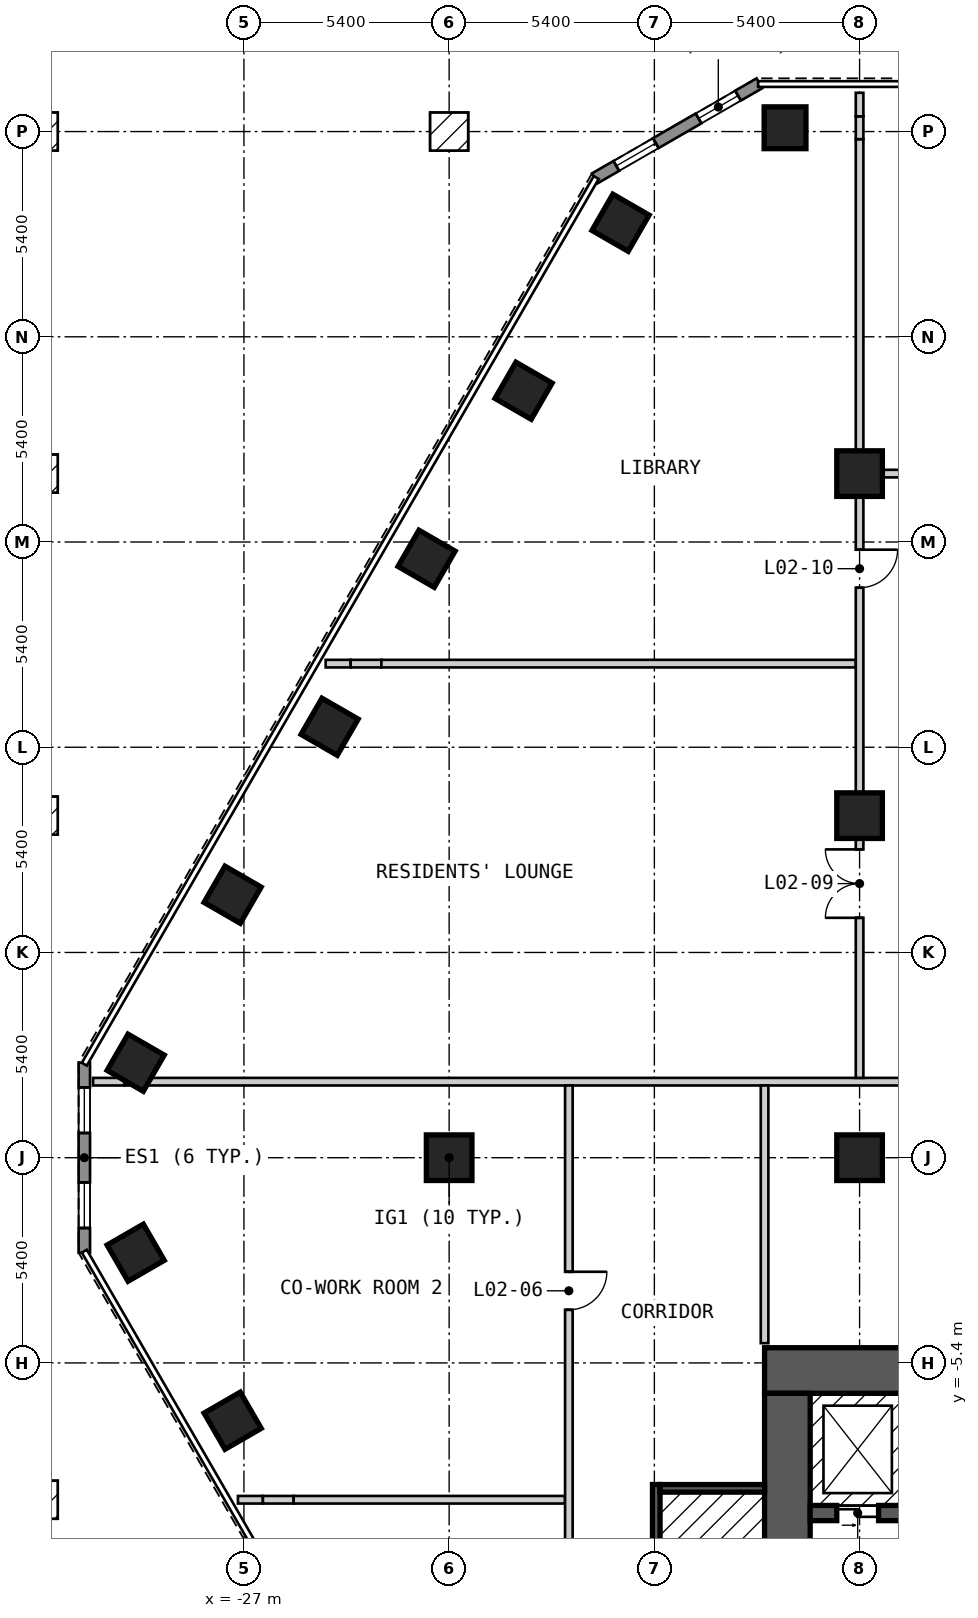
"""IFC4 building model, lengths in metres.
Left out: names, types, materials, properties, quantities, classifications, styles, units other than length and angle.
Written with IfcOpenShell. Run it as: python <this file> out.ifc"""

import sys

from ifc_helpers import new_model, si_unit, direction, frame, frame_2d, origin, origin_2d, place, context, subcontext, project, spatial, polyline, rectangle, outline, extrude, element, fill, save


model = new_model("IFC4")
c1 = context("Model", 3, precision=1e-05, world=origin(), true_north=direction((0.0, 1.0)))
c2 = subcontext(c1, "Body", "Model", "MODEL_VIEW")
j1 = project(units=[si_unit("LENGTHUNIT", "METRE"), si_unit("PLANEANGLEUNIT", "RADIAN")], contexts=[c1])
p1 = place(None, origin())
s1 = spatial("IfcSite", under=j1, at=p1, CompositionType="ELEMENT")
p2 = place(p1, origin())
s2 = spatial("IfcBuilding", under=s1, at=p2, CompositionType="ELEMENT")
p3 = place(p2, frame((0.0, 0.0, 9.0)))
s3 = spatial("IfcBuildingStorey", under=s2, at=p3, CompositionType="ELEMENT", Elevation=9.0)
for number, where, z_axis, x_axis in (
    (1, (-12.761, 27.1, 0.0), (0.0, 0.0, 1.0), (-1.0, 0.0, 0.0)),
    (2, (-17.09, 24.6, 0.0), (0.0, 0.0, 1.0), (-0.5, -0.866, 0.0)),
    (3, (-19.642, 20.18, 0.0), (0.0, 0.0, 1.0), (-0.5, -0.866, 0.0)),
    (4, (-22.194, 15.759, 0.0), (0.0, 0.0, 1.0), (-0.5, -0.866, 0.0)),
    (5, (-24.746, 11.339, 0.0), (0.0, 0.0, 1.0), (-0.5, -0.866, 0.0)),
    (6, (-27.298, 6.919, 0.0), (0.0, 0.0, 1.0), (-0.5, -0.866, 0.0)),
    (7, (-29.849, 2.499, 0.0), (0.0, 0.0, 1.0), (-0.5, -0.866, 0.0)),
    (8, (-29.848, -2.5, 0.0), (0.0, 0.0, 1.0), (0.5, -0.866, 0.0)),
    (9, (-27.297, -6.921, 0.0), (0.0, 0.0, 1.0), (0.5, -0.866, 0.0)),
):
    element("IfcColumn", number, at=place(p3, frame(where, z_axis=z_axis, x_axis=x_axis)), inside=s3, PredefinedType="COLUMN", context=c2, shape_type="SweptSolid", body=[
        extrude(rectangle(XDim=1.1, YDim=1.1, at=origin_2d()), origin(), (0.0, 0.0, 1.0), 3.6),
    ])
for number, where, z_axis, x_axis in (
    (10, (-21.6, 0.0, 0.0), (0.0, 0.0, 1.0), (1.0, 0.0, 0.0)),
    (11, (-10.8, 0.0, 0.0), (0.0, 0.0, 1.0), (1.0, 0.0, 0.0)),
    (12, (-10.8, 9.0, 0.0), (0.0, 0.0, 1.0), (1.0, 0.0, 0.0)),
    (13, (-10.8, 18.0, 0.0), (0.0, 0.0, 1.0), (1.0, 0.0, 0.0)),
):
    element("IfcColumn", number, at=place(p3, frame(where, z_axis=z_axis, x_axis=x_axis)), inside=s3, PredefinedType="COLUMN", context=c2, shape_type="SweptSolid", body=[
        extrude(rectangle(XDim=1.2, YDim=1.2, at=origin_2d()), origin(), (0.0, 0.0, 1.0), 3.6),
    ])
p4 = place(p3, frame((-13.3, -5.6, 0.0), z_axis=(0.0, 0.0, 1.0), x_axis=(1.0, 0.0, 0.0)))
e14 = element("IfcWall", 14, at=p4, inside=s3, PredefinedType="SHEAR", context=c2, shape_type="SweptSolid", body=[
    extrude(rectangle(XDim=26.6, YDim=1.2, at=frame_2d((13.3, 0.0))), origin(), (0.0, 0.0, 1.0), 3.25),
])
p5 = place(p4, frame((23.65, 0.0, 0.0)))
e15 = element("IfcOpeningElement", 15, at=p5, cuts=e14, PredefinedType="OPENING", context=c2, shape_type="SweptSolid", body=[
    extrude(rectangle(XDim=1.2, YDim=2.1, at=frame_2d((0.6, 1.05))), frame((0.0, 0.61, 0.0), z_axis=(0.0, -1.0, 0.0), x_axis=(1.0, 0.0, 0.0)), (0.0, 0.0, 1.0), 1.22),
])
p6 = place(p3, frame((-12.7, -17.8, 0.0), z_axis=(0.0, 0.0, 1.0), x_axis=(0.0, 1.0, 0.0)))
e16 = element("IfcWall", 16, at=p6, inside=s3, PredefinedType="SHEAR", context=c2, shape_type="SweptSolid", body=[
    extrude(rectangle(XDim=11.6, YDim=1.2, at=frame_2d((5.8, 0.0))), origin(), (0.0, 0.0, 1.0), 3.25),
])
p7 = place(p6, frame((3.6, 0.0, 0.0)))
e17 = element("IfcOpeningElement", 17, at=p7, cuts=e16, PredefinedType="OPENING", context=c2, shape_type="SweptSolid", body=[
    extrude(rectangle(XDim=1.2, YDim=2.1, at=frame_2d((0.6, 1.05))), frame((0.0, 0.61, 0.0), z_axis=(0.0, -1.0, 0.0), x_axis=(1.0, 0.0, 0.0)), (0.0, 0.0, 1.0), 1.22),
])
p8 = place(p3, frame((-12.1, -9.35, 0.0), z_axis=(0.0, 0.0, 1.0), x_axis=(1.0, 0.0, 0.0)))
e18 = element("IfcWall", 18, at=p8, inside=s3, PredefinedType="SHEAR", context=c2, shape_type="SweptSolid", body=[
    extrude(rectangle(XDim=22.3, YDim=0.4, at=frame_2d((11.15, 0.0))), origin(), (0.0, 0.0, 1.0), 3.25),
])
p9 = place(p8, frame((0.7, 0.0, 0.0)))
e19 = element("IfcOpeningElement", 19, at=p9, cuts=e18, PredefinedType="OPENING", context=c2, shape_type="SweptSolid", body=[
    extrude(rectangle(XDim=1.1, YDim=2.1, at=frame_2d((0.55, 1.05))), frame((0.0, 0.21, 0.0), z_axis=(0.0, -1.0, 0.0), x_axis=(1.0, 0.0, 0.0)), (0.0, 0.0, 1.0), 0.42),
])
p10 = place(p8, frame((3.5, 0.0, 0.0)))
e20 = element("IfcOpeningElement", 20, at=p10, cuts=e18, PredefinedType="OPENING", context=c2, shape_type="SweptSolid", body=[
    extrude(rectangle(XDim=1.1, YDim=2.1, at=frame_2d((0.55, 1.05))), frame((0.0, 0.21, 0.0), z_axis=(0.0, -1.0, 0.0), x_axis=(1.0, 0.0, 0.0)), (0.0, 0.0, 1.0), 0.42),
])
p11 = place(p8, frame((6.3, 0.0, 0.0)))
e21 = element("IfcOpeningElement", 21, at=p11, cuts=e18, PredefinedType="OPENING", context=c2, shape_type="SweptSolid", body=[
    extrude(rectangle(XDim=1.1, YDim=2.1, at=frame_2d((0.55, 1.05))), frame((0.0, 0.21, 0.0), z_axis=(0.0, -1.0, 0.0), x_axis=(1.0, 0.0, 0.0)), (0.0, 0.0, 1.0), 0.42),
])
p12 = place(p8, frame((8.6, 0.0, 0.0)))
e22 = element("IfcOpeningElement", 22, at=p12, cuts=e18, PredefinedType="OPENING", context=c2, shape_type="SweptSolid", body=[
    extrude(rectangle(XDim=1.1, YDim=2.1, at=frame_2d((0.55, 1.05))), frame((0.0, 0.21, 0.0), z_axis=(0.0, -1.0, 0.0), x_axis=(1.0, 0.0, 0.0)), (0.0, 0.0, 1.0), 0.42),
])
p13 = place(p8, frame((10.9, 0.0, 0.0)))
e23 = element("IfcOpeningElement", 23, at=p13, cuts=e18, PredefinedType="OPENING", context=c2, shape_type="SweptSolid", body=[
    extrude(rectangle(XDim=1.1, YDim=2.1, at=frame_2d((0.55, 1.05))), frame((0.0, 0.21, 0.0), z_axis=(0.0, -1.0, 0.0), x_axis=(1.0, 0.0, 0.0)), (0.0, 0.0, 1.0), 0.42),
])
p14 = place(p8, frame((13.2, 0.0, 0.0)))
e24 = element("IfcOpeningElement", 24, at=p14, cuts=e18, PredefinedType="OPENING", context=c2, shape_type="SweptSolid", body=[
    extrude(rectangle(XDim=1.1, YDim=2.1, at=frame_2d((0.55, 1.05))), frame((0.0, 0.21, 0.0), z_axis=(0.0, -1.0, 0.0), x_axis=(1.0, 0.0, 0.0)), (0.0, 0.0, 1.0), 0.42),
])
p15 = place(p8, frame((15.5, 0.0, 0.0)))
e25 = element("IfcOpeningElement", 25, at=p15, cuts=e18, PredefinedType="OPENING", context=c2, shape_type="SweptSolid", body=[
    extrude(rectangle(XDim=1.1, YDim=2.1, at=frame_2d((0.55, 1.05))), frame((0.0, 0.21, 0.0), z_axis=(0.0, -1.0, 0.0), x_axis=(1.0, 0.0, 0.0)), (0.0, 0.0, 1.0), 0.42),
])
p16 = place(p8, frame((17.8, 0.0, 0.0)))
e26 = element("IfcOpeningElement", 26, at=p16, cuts=e18, PredefinedType="OPENING", context=c2, shape_type="SweptSolid", body=[
    extrude(rectangle(XDim=1.1, YDim=2.1, at=frame_2d((0.55, 1.05))), frame((0.0, 0.21, 0.0), z_axis=(0.0, -1.0, 0.0), x_axis=(1.0, 0.0, 0.0)), (0.0, 0.0, 1.0), 0.42),
])
p17 = place(p8, frame((20.2, 0.0, 0.0)))
e27 = element("IfcOpeningElement", 27, at=p17, cuts=e18, PredefinedType="OPENING", context=c2, shape_type="SweptSolid", body=[
    extrude(rectangle(XDim=1.1, YDim=2.1, at=frame_2d((0.55, 1.05))), frame((0.0, 0.21, 0.0), z_axis=(0.0, -1.0, 0.0), x_axis=(1.0, 0.0, 0.0)), (0.0, 0.0, 1.0), 0.42),
])
p18 = place(p3, frame((-13.435, 28.27, 0.0), z_axis=(0.0, 0.0, 1.0), x_axis=(-0.866010750942, -0.50002537861, 0.0)))
e28 = element("IfcWall", 28, at=p18, inside=s3, PredefinedType="SOLIDWALL", context=c2, shape_type="SweptSolid", body=[
    extrude(outline(polyline([(0.0, -0.15), (5.0, -0.15), (4.919, 0.15), (0.08, 0.15), (0.0, -0.15)])), origin(), (0.0, 0.0, 1.0), 3.25),
])
p19 = place(p18, frame((0.65, 0.0, 0.15)))
e29 = element("IfcOpeningElement", 29, at=p19, cuts=e28, PredefinedType="OPENING", context=c2, shape_type="SweptSolid", body=[
    extrude(rectangle(XDim=1.2, YDim=2.1, at=frame_2d((0.6, 1.05))), frame((0.0, 0.16, 0.0), z_axis=(0.0, -1.0, 0.0), x_axis=(1.0, 0.0, 0.0)), (0.0, 0.0, 1.0), 0.32),
])
p20 = place(p18, frame((3.149, 0.0, 0.15)))
e30 = element("IfcOpeningElement", 30, at=p20, cuts=e28, PredefinedType="OPENING", context=c2, shape_type="SweptSolid", body=[
    extrude(rectangle(XDim=1.2, YDim=2.1, at=frame_2d((0.6, 1.05))), frame((0.0, 0.16, 0.0), z_axis=(0.0, -1.0, 0.0), x_axis=(1.0, 0.0, 0.0)), (0.0, 0.0, 1.0), 0.32),
])
p21 = place(p3, frame((-31.2, 2.5, 0.0), z_axis=(0.0, 0.0, 1.0), x_axis=(0.0, -1.0, 0.0)))
e31 = element("IfcWall", 31, at=p21, inside=s3, PredefinedType="SOLIDWALL", context=c2, shape_type="SweptSolid", body=[
    extrude(outline(polyline([(0.0, -0.15), (5.0, -0.15), (4.92, 0.15), (0.08, 0.15), (0.0, -0.15)])), origin(), (0.0, 0.0, 1.0), 3.25),
])
p22 = place(p21, frame((0.65, 0.0, 0.15)))
e32 = element("IfcOpeningElement", 32, at=p22, cuts=e31, PredefinedType="OPENING", context=c2, shape_type="SweptSolid", body=[
    extrude(rectangle(XDim=1.2, YDim=2.1, at=frame_2d((0.6, 1.05))), frame((0.0, 0.16, 0.0), z_axis=(0.0, -1.0, 0.0), x_axis=(1.0, 0.0, 0.0)), (0.0, 0.0, 1.0), 0.32),
])
p23 = place(p21, frame((3.15, 0.0, 0.15)))
e33 = element("IfcOpeningElement", 33, at=p23, cuts=e31, PredefinedType="OPENING", context=c2, shape_type="SweptSolid", body=[
    extrude(rectangle(XDim=1.2, YDim=2.1, at=frame_2d((0.6, 1.05))), frame((0.0, 0.16, 0.0), z_axis=(0.0, -1.0, 0.0), x_axis=(1.0, 0.0, 0.0)), (0.0, 0.0, 1.0), 0.32),
])
p24 = place(p3, frame((-27.158, -9.0, 0.0), z_axis=(0.0, 0.0, 1.0), x_axis=(1.0, 0.0, 0.0)))
e34 = element("IfcWall", 34, at=p24, inside=s3, PredefinedType="PARTITIONING", context=c2, shape_type="SweptSolid", body=[
    extrude(rectangle(XDim=0.657, YDim=0.2, at=frame_2d((0.329, 0.0))), origin(), (0.0, 0.0, 1.0), 3.25),
])
p25 = place(p3, frame((-26.501, -9.0, 0.0), z_axis=(0.0, 0.0, 1.0), x_axis=(1.0, 0.0, 0.0)))
e35 = element("IfcWall", 35, at=p25, inside=s3, PredefinedType="PARTITIONING", context=c2, shape_type="SweptSolid", body=[
    extrude(rectangle(XDim=0.809, YDim=0.2, at=frame_2d((0.405, 0.0))), origin(), (0.0, 0.0, 1.0), 2.52),
])
p26 = place(p3, frame((-25.692, -9.0, 0.0), z_axis=(0.0, 0.0, 1.0), x_axis=(1.0, 0.0, 0.0)))
e36 = element("IfcWall", 36, at=p26, inside=s3, PredefinedType="PARTITIONING", context=c2, shape_type="SweptSolid", body=[
    extrude(rectangle(XDim=7.142, YDim=0.2, at=frame_2d((3.571, 0.0))), origin(), (0.0, 0.0, 1.0), 3.25),
])
p27 = place(p3, frame((-30.97, 2.0, 0.0), z_axis=(0.0, 0.0, 1.0), x_axis=(1.0, 0.0, 0.0)))
e37 = element("IfcWall", 37, at=p27, inside=s3, PredefinedType="PARTITIONING", context=c2, shape_type="SweptSolid", body=[
    extrude(rectangle(XDim=0.821, YDim=0.2, at=frame_2d((0.411, 0.0))), origin(), (0.0, 0.0, 1.0), 3.25),
])
p28 = place(p3, frame((-30.149, 2.0, 0.0), z_axis=(0.0, 0.0, 1.0), x_axis=(1.0, 0.0, 0.0)))
e38 = element("IfcWall", 38, at=p28, inside=s3, PredefinedType="PARTITIONING", context=c2, shape_type="SweptSolid", body=[
    extrude(rectangle(XDim=0.6, YDim=0.2, at=frame_2d((0.3, 0.0))), origin(), (0.0, 0.0, 1.0), 2.52),
])
p29 = place(p3, frame((-29.549, 2.0, 0.0), z_axis=(0.0, 0.0, 1.0), x_axis=(1.0, 0.0, 0.0)))
e39 = element("IfcWall", 39, at=p29, inside=s3, PredefinedType="PARTITIONING", context=c2, shape_type="SweptSolid", body=[
    extrude(rectangle(XDim=59.097, YDim=0.2, at=frame_2d((29.549, 0.0))), origin(), (0.0, 0.0, 1.0), 3.25),
])
p30 = place(p29, frame((20.651, 0.0, 0.0)))
e40 = element("IfcOpeningElement", 40, at=p30, cuts=e39, PredefinedType="OPENING", context=c2, shape_type="SweptSolid", body=[
    extrude(rectangle(XDim=1.8, YDim=2.1, at=frame_2d((0.9, 1.05))), frame((0.0, 0.11, 0.0), z_axis=(0.0, -1.0, 0.0), x_axis=(1.0, 0.0, 0.0)), (0.0, 0.0, 1.0), 0.22),
])
p31 = place(p29, frame((36.647, 0.0, 0.0)))
e41 = element("IfcOpeningElement", 41, at=p31, cuts=e39, PredefinedType="OPENING", context=c2, shape_type="SweptSolid", body=[
    extrude(rectangle(XDim=1.8, YDim=2.1, at=frame_2d((0.9, 1.05))), frame((0.0, 0.11, 0.0), z_axis=(0.0, -1.0, 0.0), x_axis=(1.0, 0.0, 0.0)), (0.0, 0.0, 1.0), 0.22),
])
p32 = place(p29, frame((28.649, 0.0, 0.0)))
e42 = element("IfcOpeningElement", 42, at=p32, cuts=e39, PredefinedType="OPENING", context=c2, shape_type="SweptSolid", body=[
    extrude(rectangle(XDim=1.8, YDim=2.1, at=frame_2d((0.9, 1.05))), frame((0.0, 0.11, 0.0), z_axis=(0.0, -1.0, 0.0), x_axis=(1.0, 0.0, 0.0)), (0.0, 0.0, 1.0), 0.22),
])
p33 = place(p3, frame((-24.849, 13.0, 0.0), z_axis=(0.0, 0.0, 1.0), x_axis=(1.0, 0.0, 0.0)))
e43 = element("IfcWall", 43, at=p33, inside=s3, PredefinedType="PARTITIONING", context=c2, shape_type="SweptSolid", body=[
    extrude(rectangle(XDim=0.658, YDim=0.2, at=frame_2d((0.329, 0.0))), origin(), (0.0, 0.0, 1.0), 3.25),
])
p34 = place(p3, frame((-24.191, 13.0, 0.0), z_axis=(0.0, 0.0, 1.0), x_axis=(1.0, 0.0, 0.0)))
e44 = element("IfcWall", 44, at=p34, inside=s3, PredefinedType="PARTITIONING", context=c2, shape_type="SweptSolid", body=[
    extrude(rectangle(XDim=0.808, YDim=0.2, at=frame_2d((0.404, 0.0))), origin(), (0.0, 0.0, 1.0), 2.52),
])
p35 = place(p3, frame((-23.383, 13.0, 0.0), z_axis=(0.0, 0.0, 1.0), x_axis=(1.0, 0.0, 0.0)))
e45 = element("IfcWall", 45, at=p35, inside=s3, PredefinedType="PARTITIONING", context=c2, shape_type="SweptSolid", body=[
    extrude(rectangle(XDim=12.483, YDim=0.2, at=frame_2d((6.242, 0.0))), origin(), (0.0, 0.0, 1.0), 3.25),
])
p36 = place(p3, frame((-10.7, 18.0, 0.0), z_axis=(0.0, 0.0, 1.0), x_axis=(1.0, 0.0, 0.0)))
e46 = element("IfcWall", 46, at=p36, inside=s3, PredefinedType="PARTITIONING", context=c2, shape_type="SweptSolid", body=[
    extrude(rectangle(XDim=21.4, YDim=0.2, at=frame_2d((10.7, 0.0))), origin(), (0.0, 0.0, 1.0), 3.25),
])
p37 = place(p36, frame((8.86, 0.0, 0.0)))
e47 = element("IfcOpeningElement", 47, at=p37, cuts=e46, PredefinedType="OPENING", context=c2, shape_type="SweptSolid", body=[
    extrude(rectangle(XDim=1.0, YDim=2.1, at=frame_2d((0.5, 1.05))), frame((0.0, 0.11, 0.0), z_axis=(0.0, -1.0, 0.0), x_axis=(1.0, 0.0, 0.0)), (0.0, 0.0, 1.0), 0.22),
])
p38 = place(p3, frame((-18.45, -21.471, 0.0), z_axis=(0.0, 0.0, 1.0), x_axis=(0.0, 1.0, 0.0)))
e48 = element("IfcWall", 48, at=p38, inside=s3, PredefinedType="PARTITIONING", context=c2, shape_type="SweptSolid", body=[
    extrude(rectangle(XDim=23.371, YDim=0.2, at=frame_2d((11.686, 0.0))), origin(), (0.0, 0.0, 1.0), 3.25),
])
p39 = place(p38, frame((5.873, 0.0, 0.0)))
e49 = element("IfcOpeningElement", 49, at=p39, cuts=e48, PredefinedType="OPENING", context=c2, shape_type="SweptSolid", body=[
    extrude(rectangle(XDim=1.0, YDim=2.1, at=frame_2d((0.5, 1.05))), frame((0.0, 0.11, 0.0), z_axis=(0.0, -1.0, 0.0), x_axis=(1.0, 0.0, 0.0)), (0.0, 0.0, 1.0), 0.22),
])
p40 = place(p38, frame((17.469, 0.0, 0.0)))
e50 = element("IfcOpeningElement", 50, at=p40, cuts=e48, PredefinedType="OPENING", context=c2, shape_type="SweptSolid", body=[
    extrude(rectangle(XDim=1.0, YDim=2.1, at=frame_2d((0.5, 1.05))), frame((0.0, 0.11, 0.0), z_axis=(0.0, -1.0, 0.0), x_axis=(1.0, 0.0, 0.0)), (0.0, 0.0, 1.0), 0.22),
])
p41 = place(p3, frame((-13.3, -4.88, 0.0), z_axis=(0.0, 0.0, 1.0), x_axis=(0.0, 1.0, 0.0)))
e51 = element("IfcWall", 51, at=p41, inside=s3, PredefinedType="PARTITIONING", context=c2, shape_type="SweptSolid", body=[
    extrude(rectangle(XDim=6.78, YDim=0.2, at=frame_2d((3.39, 0.0))), origin(), (0.0, 0.0, 1.0), 3.25),
])
p42 = place(p3, frame((-10.8, 2.1, 0.0), z_axis=(0.0, 0.0, 1.0), x_axis=(0.0, 1.0, 0.0)))
e52 = element("IfcWall", 52, at=p42, inside=s3, PredefinedType="PARTITIONING", context=c2, shape_type="SweptSolid", body=[
    extrude(rectangle(XDim=24.7, YDim=0.2, at=frame_2d((12.35, 0.0))), origin(), (0.0, 0.0, 1.0), 3.25),
])
p43 = place(p42, frame((4.212, 0.0, 0.0)))
e53 = element("IfcOpeningElement", 53, at=p43, cuts=e52, PredefinedType="OPENING", context=c2, shape_type="SweptSolid", body=[
    extrude(rectangle(XDim=1.8, YDim=2.1, at=frame_2d((0.9, 1.05))), frame((0.0, 0.11, 0.0), z_axis=(0.0, -1.0, 0.0), x_axis=(1.0, 0.0, 0.0)), (0.0, 0.0, 1.0), 0.22),
])
p44 = place(p42, frame((12.898, 0.0, 0.0)))
e54 = element("IfcOpeningElement", 54, at=p44, cuts=e52, PredefinedType="OPENING", context=c2, shape_type="SweptSolid", body=[
    extrude(rectangle(XDim=1.0, YDim=2.1, at=frame_2d((0.5, 1.05))), frame((0.0, 0.11, 0.0), z_axis=(0.0, -1.0, 0.0), x_axis=(1.0, 0.0, 0.0)), (0.0, 0.0, 1.0), 0.22),
])
p45 = place(p3, frame((-10.8, 26.8, 0.0), z_axis=(0.0, 0.0, 1.0), x_axis=(0.0, 1.0, 0.0)))
e55 = element("IfcWall", 55, at=p45, inside=s3, PredefinedType="PARTITIONING", context=c2, shape_type="SweptSolid", body=[
    extrude(rectangle(XDim=0.6, YDim=0.2, at=frame_2d((0.3, 0.0))), origin(), (0.0, 0.0, 1.0), 2.52),
])
p46 = place(p3, frame((-10.8, 27.4, 0.0), z_axis=(0.0, 0.0, 1.0), x_axis=(0.0, 1.0, 0.0)))
e56 = element("IfcWall", 56, at=p46, inside=s3, PredefinedType="PARTITIONING", context=c2, shape_type="SweptSolid", body=[
    extrude(rectangle(XDim=0.62, YDim=0.2, at=frame_2d((0.31, 0.0))), origin(), (0.0, 0.0, 1.0), 3.25),
])
p47 = place(p3, frame((-16.15, -14.4, 0.0), z_axis=(0.0, 0.0, 1.0), x_axis=(0.0, 1.0, 0.0)))
e57 = element("IfcWall", 57, at=p47, inside=s3, PredefinedType="SOLIDWALL", context=c2, shape_type="SweptSolid", body=[
    extrude(rectangle(XDim=5.8, YDim=0.2, at=frame_2d((2.9, 0.0))), origin(), (0.0, 0.0, 1.0), 3.25),
])
p48 = place(p3, frame((-16.05, -8.7, 0.0), z_axis=(0.0, 0.0, 1.0), x_axis=(1.0, 0.0, 0.0)))
e58 = element("IfcWall", 58, at=p48, inside=s3, PredefinedType="SOLIDWALL", context=c2, shape_type="SweptSolid", body=[
    extrude(rectangle(XDim=2.75, YDim=0.2, at=frame_2d((1.375, 0.0))), origin(), (0.0, 0.0, 1.0), 3.25),
])
p49 = place(p19, origin())
e59 = element("IfcWindow", 59, at=p49, inside=s3, PartitioningType="SINGLE_PANEL", PredefinedType="WINDOW", context=c2, shape_type="SweptSolid", body=[
    extrude(rectangle(XDim=1.2, YDim=2.1, at=frame_2d((0.6, 1.05))), frame((0.0, 0.03, 0.0), z_axis=(0.0, -1.0, 0.0), x_axis=(1.0, 0.0, 0.0)), (0.0, 0.0, 1.0), 0.06),
])
fill(e29, e59)
p50 = place(p20, origin())
e60 = element("IfcWindow", 60, at=p50, inside=s3, PartitioningType="SINGLE_PANEL", PredefinedType="WINDOW", context=c2, shape_type="SweptSolid", body=[
    extrude(rectangle(XDim=1.2, YDim=2.1, at=frame_2d((0.6, 1.05))), frame((0.0, 0.03, 0.0), z_axis=(0.0, -1.0, 0.0), x_axis=(1.0, 0.0, 0.0)), (0.0, 0.0, 1.0), 0.06),
])
fill(e30, e60)
p51 = place(p22, origin())
e61 = element("IfcWindow", 61, at=p51, inside=s3, PartitioningType="SINGLE_PANEL", PredefinedType="WINDOW", context=c2, shape_type="SweptSolid", body=[
    extrude(rectangle(XDim=1.2, YDim=2.1, at=frame_2d((0.6, 1.05))), frame((0.0, 0.03, 0.0), z_axis=(0.0, -1.0, 0.0), x_axis=(1.0, 0.0, 0.0)), (0.0, 0.0, 1.0), 0.06),
])
fill(e32, e61)
p52 = place(p23, origin())
e62 = element("IfcWindow", 62, at=p52, inside=s3, PartitioningType="SINGLE_PANEL", PredefinedType="WINDOW", context=c2, shape_type="SweptSolid", body=[
    extrude(rectangle(XDim=1.2, YDim=2.1, at=frame_2d((0.6, 1.05))), frame((0.0, 0.03, 0.0), z_axis=(0.0, -1.0, 0.0), x_axis=(1.0, 0.0, 0.0)), (0.0, 0.0, 1.0), 0.06),
])
fill(e33, e62)
p53 = place(p40, origin())
e63 = element("IfcDoor", 63, at=p53, inside=s3, OperationType="SINGLE_SWING_RIGHT", PredefinedType="DOOR", context=c2, shape_type="SweptSolid", body=[
    extrude(rectangle(XDim=1.0, YDim=2.1, at=frame_2d((0.5, 1.05))), frame((0.0, 0.025, 0.0), z_axis=(0.0, -1.0, 0.0), x_axis=(1.0, 0.0, 0.0)), (0.0, 0.0, 1.0), 0.05),
])
fill(e50, e63)
p54 = place(p43, origin())
e64 = element("IfcDoor", 64, at=p54, inside=s3, OperationType="DOUBLE_DOOR_SINGLE_SWING", PredefinedType="DOOR", context=c2, shape_type="SweptSolid", body=[
    extrude(rectangle(XDim=1.8, YDim=2.1, at=frame_2d((0.9, 1.05))), frame((0.0, 0.025, 0.0), z_axis=(0.0, -1.0, 0.0), x_axis=(1.0, 0.0, 0.0)), (0.0, 0.0, 1.0), 0.05),
])
fill(e53, e64)
p55 = place(p44, origin())
e65 = element("IfcDoor", 65, at=p55, inside=s3, OperationType="SINGLE_SWING_RIGHT", PredefinedType="DOOR", context=c2, shape_type="SweptSolid", body=[
    extrude(rectangle(XDim=1.0, YDim=2.1, at=frame_2d((0.5, 1.05))), frame((0.0, 0.025, 0.0), z_axis=(0.0, -1.0, 0.0), x_axis=(1.0, 0.0, 0.0)), (0.0, 0.0, 1.0), 0.05),
])
fill(e54, e65)
p56 = place(p9, origin())
e66 = element("IfcDoor", 66, at=p56, inside=s3, OperationType="DOUBLE_DOOR_SLIDING", PredefinedType="DOOR", context=c2, shape_type="SweptSolid", body=[
    extrude(rectangle(XDim=1.1, YDim=2.1, at=frame_2d((0.55, 1.05))), frame((0.0, 0.025, 0.0), z_axis=(0.0, -1.0, 0.0), x_axis=(1.0, 0.0, 0.0)), (0.0, 0.0, 1.0), 0.05),
])
fill(e19, e66)
save(model, sys.argv[1])
